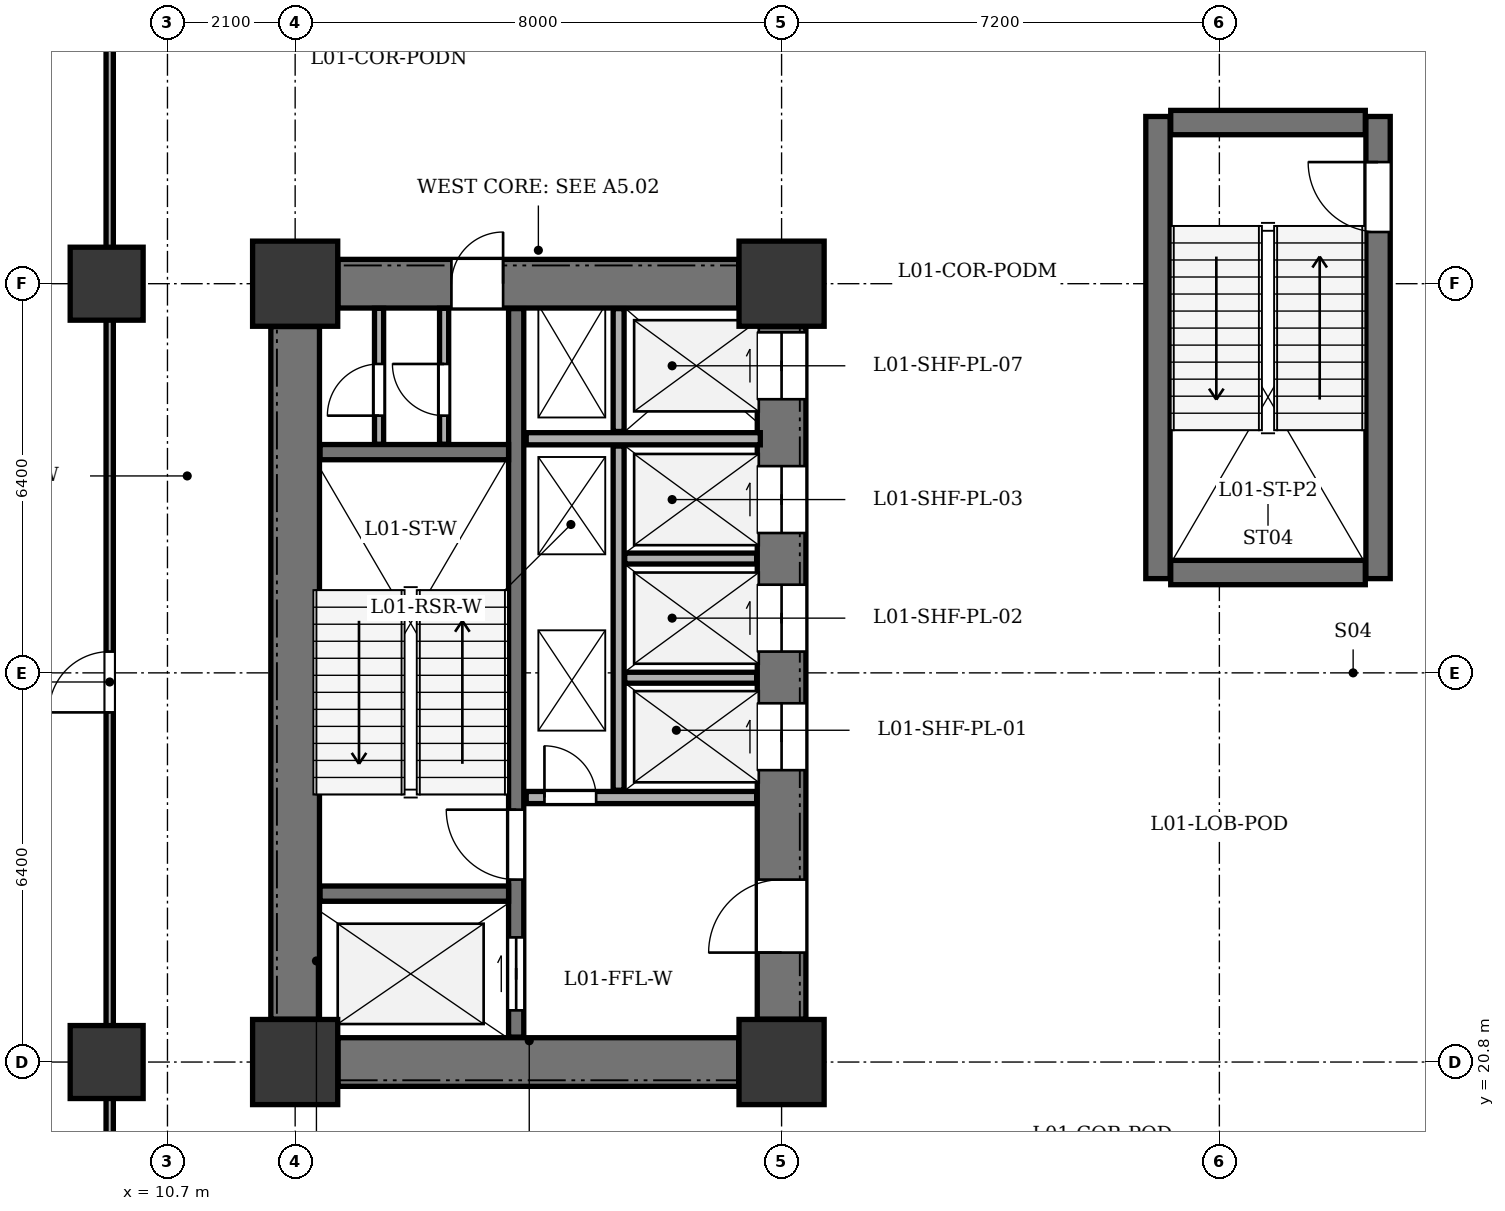
"""IFC4 building model, lengths in metres.
Left out: names, types, materials, properties, quantities, classifications, styles, units other than length and angle.
Written with IfcOpenShell. Run it as: python <this file> out.ifc"""

import sys

from ifc_helpers import new_model, si_unit, direction, frame, frame_2d, origin, origin_2d, place, context, subcontext, project, spatial, rectangle, extrude, element, fill, save


model = new_model("IFC4")
c1 = context("Model", 3, precision=1e-05, world=origin(), true_north=direction((0.0, 1.0)))
c2 = subcontext(c1, "Body", "Model", "MODEL_VIEW")
j1 = project(units=[si_unit("LENGTHUNIT", "METRE"), si_unit("PLANEANGLEUNIT", "RADIAN")], contexts=[c1])
p1 = place(None, origin())
s1 = spatial("IfcSite", under=j1, at=p1, CompositionType="ELEMENT")
p2 = place(p1, origin())
s2 = spatial("IfcBuilding", under=s1, at=p2, CompositionType="ELEMENT")
p3 = place(p2, frame((0.0, 0.0, 5.4)))
s3 = spatial("IfcBuildingStorey", under=s2, at=p3, CompositionType="ELEMENT", Elevation=5.4)
for number, where, z_axis, x_axis in (
    (1, (12.8, 20.8, 0.0), (0.0, 0.0, 1.0), (1.0, 0.0, 0.0)),
    (2, (20.8, 20.8, 0.0), (0.0, 0.0, 1.0), (1.0, 0.0, 0.0)),
    (3, (12.8, 33.6, 0.0), (0.0, 0.0, 1.0), (1.0, 0.0, 0.0)),
    (4, (20.8, 33.6, 0.0), (0.0, 0.0, 1.0), (1.0, 0.0, 0.0)),
):
    element("IfcColumn", number, at=place(p3, frame(where, z_axis=z_axis, x_axis=x_axis)), inside=s3, PredefinedType="COLUMN", context=c2, shape_type="SweptSolid", body=[
        extrude(rectangle(XDim=1.4, YDim=1.4, at=origin_2d()), origin(), (0.0, 0.0, 1.0), 4.5),
    ])
for number, where, z_axis, x_axis in (
    (5, (9.7, 20.8, 0.0), (0.0, 0.0, 1.0), (1.0, 0.0, 0.0)),
    (6, (9.7, 33.6, 0.0), (0.0, 0.0, 1.0), (1.0, 0.0, 0.0)),
):
    element("IfcColumn", number, at=place(p3, frame(where, z_axis=z_axis, x_axis=x_axis)), inside=s3, PredefinedType="COLUMN", context=c2, shape_type="SweptSolid", body=[
        extrude(rectangle(XDim=1.2, YDim=1.2, at=origin_2d()), origin(), (0.0, 0.0, 1.0), 4.5),
    ])
p4 = place(p3, frame((12.8, 21.505, 0.0), z_axis=(0.0, 0.0, 1.0), x_axis=(0.0, 1.0, 0.0)))
e7 = element("IfcWall", 7, at=p4, inside=s3, PredefinedType="SHEAR", context=c2, shape_type="SweptSolid", body=[
    extrude(rectangle(XDim=11.39, YDim=0.8, at=frame_2d((5.695, 0.0))), origin(), (0.0, 0.0, 1.0), 4.18),
])
p5 = place(p3, frame((13.505, 20.8, 0.0), z_axis=(0.0, 0.0, 1.0), x_axis=(1.0, 0.0, 0.0)))
e8 = element("IfcWall", 8, at=p5, inside=s3, PredefinedType="SHEAR", context=c2, shape_type="SweptSolid", body=[
    extrude(rectangle(XDim=6.59, YDim=0.8, at=frame_2d((3.295, 0.0))), origin(), (0.0, 0.0, 1.0), 4.18),
])
p6 = place(p3, frame((13.505, 33.6, 0.0), z_axis=(0.0, 0.0, 1.0), x_axis=(1.0, 0.0, 0.0)))
e9 = element("IfcWall", 9, at=p6, inside=s3, PredefinedType="SHEAR", context=c2, shape_type="SweptSolid", body=[
    extrude(rectangle(XDim=6.59, YDim=0.8, at=frame_2d((3.295, 0.0))), origin(), (0.0, 0.0, 1.0), 4.18),
])
p7 = place(p6, frame((1.865, 0.0, 0.0)))
e10 = element("IfcOpeningElement", 10, at=p7, cuts=e9, PredefinedType="OPENING", context=c2, shape_type="SweptSolid", body=[
    extrude(rectangle(XDim=0.85, YDim=2.02, at=frame_2d((0.425, 1.01))), frame((0.0, 0.41, 0.0), z_axis=(0.0, -1.0, 0.0), x_axis=(1.0, 0.0, 0.0)), (0.0, 0.0, 1.0), 0.82),
])
p8 = place(p3, frame((20.8, 21.505, 0.0), z_axis=(0.0, 0.0, 1.0), x_axis=(0.0, 1.0, 0.0)))
e11 = element("IfcWall", 11, at=p8, inside=s3, PredefinedType="SHEAR", context=c2, shape_type="SweptSolid", body=[
    extrude(rectangle(XDim=11.39, YDim=0.8, at=frame_2d((5.695, 0.0))), origin(), (0.0, 0.0, 1.0), 4.18),
])
p9 = place(p8, frame((1.095, 0.0, 0.0)))
e12 = element("IfcOpeningElement", 12, at=p9, cuts=e11, PredefinedType="OPENING", context=c2, shape_type="SweptSolid", body=[
    extrude(rectangle(XDim=1.2, YDim=2.15, at=frame_2d((0.6, 1.075))), frame((0.0, 0.41, 0.0), z_axis=(0.0, -1.0, 0.0), x_axis=(1.0, 0.0, 0.0)), (0.0, 0.0, 1.0), 0.82),
])
p10 = place(p8, frame((4.095, 0.0, 0.0)))
e13 = element("IfcOpeningElement", 13, at=p10, cuts=e11, PredefinedType="OPENING", context=c2, shape_type="SweptSolid", body=[
    extrude(rectangle(XDim=1.1, YDim=2.1, at=frame_2d((0.55, 1.05))), frame((0.0, 0.41, 0.0), z_axis=(0.0, -1.0, 0.0), x_axis=(1.0, 0.0, 0.0)), (0.0, 0.0, 1.0), 0.82),
])
p11 = place(p8, frame((6.045, 0.0, 0.0)))
e14 = element("IfcOpeningElement", 14, at=p11, cuts=e11, PredefinedType="OPENING", context=c2, shape_type="SweptSolid", body=[
    extrude(rectangle(XDim=1.1, YDim=2.1, at=frame_2d((0.55, 1.05))), frame((0.0, 0.41, 0.0), z_axis=(0.0, -1.0, 0.0), x_axis=(1.0, 0.0, 0.0)), (0.0, 0.0, 1.0), 0.82),
])
p12 = place(p8, frame((7.995, 0.0, 0.0)))
e15 = element("IfcOpeningElement", 15, at=p12, cuts=e11, PredefinedType="OPENING", context=c2, shape_type="SweptSolid", body=[
    extrude(rectangle(XDim=1.1, YDim=2.1, at=frame_2d((0.55, 1.05))), frame((0.0, 0.41, 0.0), z_axis=(0.0, -1.0, 0.0), x_axis=(1.0, 0.0, 0.0)), (0.0, 0.0, 1.0), 0.82),
])
p13 = place(p8, frame((10.195, 0.0, 0.0)))
e16 = element("IfcOpeningElement", 16, at=p13, cuts=e11, PredefinedType="OPENING", context=c2, shape_type="SweptSolid", body=[
    extrude(rectangle(XDim=1.1, YDim=2.1, at=frame_2d((0.55, 1.05))), frame((0.0, 0.41, 0.0), z_axis=(0.0, -1.0, 0.0), x_axis=(1.0, 0.0, 0.0)), (0.0, 0.0, 1.0), 0.82),
])
p14 = place(p3, frame((16.435, 21.21, 0.0), z_axis=(0.0, 0.0, 1.0), x_axis=(0.0, 1.0, 0.0)))
e17 = element("IfcWall", 17, at=p14, inside=s3, PredefinedType="SHEAR", context=c2, shape_type="SweptSolid", body=[
    extrude(rectangle(XDim=11.98, YDim=0.25, at=frame_2d((5.99, 0.0))), origin(), (0.0, 0.0, 1.0), 4.18),
])
p15 = place(p14, frame((0.44, 0.0, 0.0)))
e18 = element("IfcOpeningElement", 18, at=p15, cuts=e17, PredefinedType="OPENING", context=c2, shape_type="SweptSolid", body=[
    extrude(rectangle(XDim=1.2, YDim=2.15, at=frame_2d((0.6, 1.075))), frame((0.0, 0.135, 0.0), z_axis=(0.0, -1.0, 0.0), x_axis=(1.0, 0.0, 0.0)), (0.0, 0.0, 1.0), 0.27),
])
p16 = place(p14, frame((2.59, 0.0, 0.0)))
e19 = element("IfcOpeningElement", 19, at=p16, cuts=e17, PredefinedType="OPENING", context=c2, shape_type="SweptSolid", body=[
    extrude(rectangle(XDim=1.15, YDim=2.15, at=frame_2d((0.575, 1.075))), frame((0.0, 0.135, 0.0), z_axis=(0.0, -1.0, 0.0), x_axis=(1.0, 0.0, 0.0)), (0.0, 0.0, 1.0), 0.27),
])
for number, where, z_axis, x_axis in (
    (20, (13.21, 23.57, 0.0), (0.0, 0.0, 1.0), (1.0, 0.0, 0.0)),
    (21, (13.21, 30.83, 0.0), (0.0, 0.0, 1.0), (1.0, 0.0, 0.0)),
):
    element("IfcWall", number, at=place(p3, frame(where, z_axis=z_axis, x_axis=x_axis)), inside=s3, PredefinedType="SHEAR", context=c2, shape_type="SweptSolid", body=[
        extrude(rectangle(XDim=3.1, YDim=0.25, at=frame_2d((1.55, 0.0))), origin(), (0.0, 0.0, 1.0), 4.18),
    ])
p17 = place(p3, frame((16.6, 25.15, 0.0), z_axis=(0.0, 0.0, 1.0), x_axis=(1.0, 0.0, 0.0)))
e22 = element("IfcWall", 22, at=p17, inside=s3, PredefinedType="SOLIDWALL", context=c2, shape_type="SweptSolid", body=[
    extrude(rectangle(XDim=3.79, YDim=0.2, at=frame_2d((1.895, 0.0))), origin(), (0.0, 0.0, 1.0), 4.18),
])
p18 = place(p17, frame((0.3, 0.0, 0.0)))
e23 = element("IfcOpeningElement", 23, at=p18, cuts=e22, PredefinedType="OPENING", context=c2, shape_type="SweptSolid", body=[
    extrude(rectangle(XDim=0.85, YDim=2.02, at=frame_2d((0.425, 1.01))), frame((0.0, 0.11, 0.0), z_axis=(0.0, -1.0, 0.0), x_axis=(1.0, 0.0, 0.0)), (0.0, 0.0, 1.0), 0.22),
])
p19 = place(p3, frame((16.6, 31.05, 0.0), z_axis=(0.0, 0.0, 1.0), x_axis=(1.0, 0.0, 0.0)))
e24 = element("IfcWall", 24, at=p19, inside=s3, PredefinedType="SOLIDWALL", context=c2, shape_type="SweptSolid", body=[
    extrude(rectangle(XDim=3.85, YDim=0.2, at=frame_2d((1.925, 0.0))), origin(), (0.0, 0.0, 1.0), 4.18),
])
p20 = place(p3, frame((18.12, 25.27, 0.0), z_axis=(0.0, 0.0, 1.0), x_axis=(0.0, 1.0, 0.0)))
e25 = element("IfcWall", 25, at=p20, inside=s3, PredefinedType="PARTITIONING", context=c2, shape_type="SweptSolid", body=[
    extrude(rectangle(XDim=5.66, YDim=0.18, at=frame_2d((2.83, 0.0))), origin(), (0.0, 0.0, 1.0), 4.18),
])
p21 = place(p3, frame((18.12, 31.17, 0.0), z_axis=(0.0, 0.0, 1.0), x_axis=(0.0, 1.0, 0.0)))
e26 = element("IfcWall", 26, at=p21, inside=s3, PredefinedType="PARTITIONING", context=c2, shape_type="SweptSolid", body=[
    extrude(rectangle(XDim=2.02, YDim=0.18, at=frame_2d((1.01, 0.0))), origin(), (0.0, 0.0, 1.0), 4.18),
])
for number, where, z_axis, x_axis in (
    (27, (18.22, 27.12, 0.0), (0.0, 0.0, 1.0), (1.0, 0.0, 0.0)),
    (28, (18.22, 29.08, 0.0), (0.0, 0.0, 1.0), (1.0, 0.0, 0.0)),
):
    element("IfcWall", number, at=place(p3, frame(where, z_axis=z_axis, x_axis=x_axis)), inside=s3, PredefinedType="PARTITIONING", context=c2, shape_type="SweptSolid", body=[
        extrude(rectangle(XDim=2.17, YDim=0.18, at=frame_2d((1.085, 0.0))), origin(), (0.0, 0.0, 1.0), 4.18),
    ])
p22 = place(p3, frame((26.99, 28.75, 0.0), z_axis=(0.0, 0.0, 1.0), x_axis=(0.0, 1.0, 0.0)))
e29 = element("IfcWall", 29, at=p22, inside=s3, PredefinedType="SHEAR", context=c2, shape_type="SweptSolid", body=[
    extrude(rectangle(XDim=7.6, YDim=0.4, at=frame_2d((3.8, 0.0))), origin(), (0.0, 0.0, 1.0), 4.18),
])
p23 = place(p3, frame((30.61, 28.75, 0.0), z_axis=(0.0, 0.0, 1.0), x_axis=(0.0, 1.0, 0.0)))
e30 = element("IfcWall", 30, at=p23, inside=s3, PredefinedType="SHEAR", context=c2, shape_type="SweptSolid", body=[
    extrude(rectangle(XDim=7.6, YDim=0.4, at=frame_2d((3.8, 0.0))), origin(), (0.0, 0.0, 1.0), 4.18),
])
p24 = place(p23, frame((5.7, 0.0, 0.0)))
e31 = element("IfcOpeningElement", 31, at=p24, cuts=e30, PredefinedType="OPENING", context=c2, shape_type="SweptSolid", body=[
    extrude(rectangle(XDim=1.15, YDim=2.15, at=frame_2d((0.575, 1.075))), frame((0.0, 0.21, 0.0), z_axis=(0.0, -1.0, 0.0), x_axis=(1.0, 0.0, 0.0)), (0.0, 0.0, 1.0), 0.42),
])
for number, where, z_axis, x_axis in (
    (32, (27.2, 28.85, 0.0), (0.0, 0.0, 1.0), (1.0, 0.0, 0.0)),
    (33, (27.2, 36.25, 0.0), (0.0, 0.0, 1.0), (1.0, 0.0, 0.0)),
):
    element("IfcWall", number, at=place(p3, frame(where, z_axis=z_axis, x_axis=x_axis)), inside=s3, PredefinedType="SHEAR", context=c2, shape_type="SweptSolid", body=[
        extrude(rectangle(XDim=3.2, YDim=0.4, at=frame_2d((1.6, 0.0))), origin(), (0.0, 0.0, 1.0), 4.18),
    ])
p25 = place(p3, frame((14.18, 30.96, 0.0), z_axis=(0.0, 0.0, 1.0), x_axis=(0.0, 1.0, 0.0)))
e34 = element("IfcWall", 34, at=p25, inside=s3, PredefinedType="PARTITIONING", context=c2, shape_type="SweptSolid", body=[
    extrude(rectangle(XDim=2.235, YDim=0.15, at=frame_2d((1.118, 0.0))), origin(), (0.0, 0.0, 1.0), 4.18),
])
p26 = place(p25, frame((0.47, 0.0, 0.0)))
e35 = element("IfcOpeningElement", 35, at=p26, cuts=e34, PredefinedType="OPENING", context=c2, shape_type="SweptSolid", body=[
    extrude(rectangle(XDim=0.85, YDim=2.02, at=frame_2d((0.425, 1.01))), frame((0.0, 0.085, 0.0), z_axis=(0.0, -1.0, 0.0), x_axis=(1.0, 0.0, 0.0)), (0.0, 0.0, 1.0), 0.17),
])
p27 = place(p3, frame((15.25, 30.96, 0.0), z_axis=(0.0, 0.0, 1.0), x_axis=(0.0, 1.0, 0.0)))
e36 = element("IfcWall", 36, at=p27, inside=s3, PredefinedType="PARTITIONING", context=c2, shape_type="SweptSolid", body=[
    extrude(rectangle(XDim=2.235, YDim=0.15, at=frame_2d((1.118, 0.0))), origin(), (0.0, 0.0, 1.0), 4.18),
])
p28 = place(p27, frame((0.47, 0.0, 0.0)))
e37 = element("IfcOpeningElement", 37, at=p28, cuts=e36, PredefinedType="OPENING", context=c2, shape_type="SweptSolid", body=[
    extrude(rectangle(XDim=0.85, YDim=2.02, at=frame_2d((0.425, 1.01))), frame((0.0, 0.085, 0.0), z_axis=(0.0, -1.0, 0.0), x_axis=(1.0, 0.0, 0.0)), (0.0, 0.0, 1.0), 0.17),
])
p29 = place(p3, frame((9.75, 18.565, 0.0), z_axis=(0.0, 0.0, 1.0), x_axis=(0.0, 1.0, 0.0)))
e38 = element("IfcWall", 38, at=p29, inside=s3, PredefinedType="PARTITIONING", context=c2, shape_type="SweptSolid", body=[
    extrude(rectangle(XDim=19.72, YDim=0.12, at=frame_2d((9.86, 0.0))), origin(), (0.0, 0.0, 1.0), 3.065),
])
p30 = place(p29, frame((7.985, 0.0, 0.0)))
e39 = element("IfcOpeningElement", 39, at=p30, cuts=e38, PredefinedType="OPENING", context=c2, shape_type="SweptSolid", body=[
    extrude(rectangle(XDim=1.0, YDim=2.1, at=frame_2d((0.5, 1.05))), frame((0.0, 0.07, 0.0), z_axis=(0.0, -1.0, 0.0), x_axis=(1.0, 0.0, 0.0)), (0.0, 0.0, 1.0), 0.14),
])
p31 = place(p7, origin())
e40 = element("IfcDoor", 40, at=p31, inside=s3, OperationType="SINGLE_SWING_RIGHT", PredefinedType="DOOR", context=c2, shape_type="SweptSolid", body=[
    extrude(rectangle(XDim=0.85, YDim=2.02, at=frame_2d((0.425, 1.01))), frame((0.0, 0.025, 0.0), z_axis=(0.0, -1.0, 0.0), x_axis=(1.0, 0.0, 0.0)), (0.0, 0.0, 1.0), 0.05),
])
fill(e10, e40)
p32 = place(p9, origin())
e41 = element("IfcDoor", 41, at=p32, inside=s3, OperationType="SINGLE_SWING_LEFT", PredefinedType="DOOR", context=c2, shape_type="SweptSolid", body=[
    extrude(rectangle(XDim=1.2, YDim=2.15, at=frame_2d((0.6, 1.075))), frame((0.0, 0.025, 0.0), z_axis=(0.0, -1.0, 0.0), x_axis=(1.0, 0.0, 0.0)), (0.0, 0.0, 1.0), 0.05),
])
fill(e12, e41)
p33 = place(p10, origin())
e42 = element("IfcDoor", 42, at=p33, inside=s3, OperationType="DOUBLE_DOOR_SLIDING", PredefinedType="DOOR", context=c2, shape_type="SweptSolid", body=[
    extrude(rectangle(XDim=1.1, YDim=2.1, at=frame_2d((0.55, 1.05))), frame((0.0, 0.025, 0.0), z_axis=(0.0, -1.0, 0.0), x_axis=(1.0, 0.0, 0.0)), (0.0, 0.0, 1.0), 0.05),
])
fill(e13, e42)
p34 = place(p11, origin())
e43 = element("IfcDoor", 43, at=p34, inside=s3, OperationType="DOUBLE_DOOR_SLIDING", PredefinedType="DOOR", context=c2, shape_type="SweptSolid", body=[
    extrude(rectangle(XDim=1.1, YDim=2.1, at=frame_2d((0.55, 1.05))), frame((0.0, 0.025, 0.0), z_axis=(0.0, -1.0, 0.0), x_axis=(1.0, 0.0, 0.0)), (0.0, 0.0, 1.0), 0.05),
])
fill(e14, e43)
p35 = place(p12, origin())
e44 = element("IfcDoor", 44, at=p35, inside=s3, OperationType="DOUBLE_DOOR_SLIDING", PredefinedType="DOOR", context=c2, shape_type="SweptSolid", body=[
    extrude(rectangle(XDim=1.1, YDim=2.1, at=frame_2d((0.55, 1.05))), frame((0.0, 0.025, 0.0), z_axis=(0.0, -1.0, 0.0), x_axis=(1.0, 0.0, 0.0)), (0.0, 0.0, 1.0), 0.05),
])
fill(e15, e44)
p36 = place(p13, origin())
e45 = element("IfcDoor", 45, at=p36, inside=s3, OperationType="DOUBLE_DOOR_SLIDING", PredefinedType="DOOR", context=c2, shape_type="SweptSolid", body=[
    extrude(rectangle(XDim=1.1, YDim=2.1, at=frame_2d((0.55, 1.05))), frame((0.0, 0.025, 0.0), z_axis=(0.0, -1.0, 0.0), x_axis=(1.0, 0.0, 0.0)), (0.0, 0.0, 1.0), 0.05),
])
fill(e16, e45)
p37 = place(p15, origin())
e46 = element("IfcDoor", 46, at=p37, inside=s3, OperationType="DOUBLE_DOOR_SLIDING", PredefinedType="DOOR", context=c2, shape_type="SweptSolid", body=[
    extrude(rectangle(XDim=1.2, YDim=2.15, at=frame_2d((0.6, 1.075))), frame((0.0, 0.025, 0.0), z_axis=(0.0, -1.0, 0.0), x_axis=(1.0, 0.0, 0.0)), (0.0, 0.0, 1.0), 0.05),
])
fill(e18, e46)
p38 = place(p16, origin())
e47 = element("IfcDoor", 47, at=p38, inside=s3, OperationType="SINGLE_SWING_RIGHT", PredefinedType="DOOR", context=c2, shape_type="SweptSolid", body=[
    extrude(rectangle(XDim=1.15, YDim=2.15, at=frame_2d((0.575, 1.075))), frame((0.0, 0.025, 0.0), z_axis=(0.0, -1.0, 0.0), x_axis=(1.0, 0.0, 0.0)), (0.0, 0.0, 1.0), 0.05),
])
fill(e19, e47)
p39 = place(p18, origin())
e48 = element("IfcDoor", 48, at=p39, inside=s3, OperationType="SINGLE_SWING_LEFT", PredefinedType="DOOR", context=c2, shape_type="SweptSolid", body=[
    extrude(rectangle(XDim=0.85, YDim=2.02, at=frame_2d((0.425, 1.01))), frame((0.0, 0.025, 0.0), z_axis=(0.0, -1.0, 0.0), x_axis=(1.0, 0.0, 0.0)), (0.0, 0.0, 1.0), 0.05),
])
fill(e23, e48)
p40 = place(p24, origin())
e49 = element("IfcDoor", 49, at=p40, inside=s3, OperationType="SINGLE_SWING_RIGHT", PredefinedType="DOOR", context=c2, shape_type="SweptSolid", body=[
    extrude(rectangle(XDim=1.15, YDim=2.15, at=frame_2d((0.575, 1.075))), frame((0.0, 0.025, 0.0), z_axis=(0.0, -1.0, 0.0), x_axis=(1.0, 0.0, 0.0)), (0.0, 0.0, 1.0), 0.05),
])
fill(e31, e49)
p41 = place(p26, origin())
e50 = element("IfcDoor", 50, at=p41, inside=s3, OperationType="SINGLE_SWING_LEFT", PredefinedType="DOOR", context=c2, shape_type="SweptSolid", body=[
    extrude(rectangle(XDim=0.85, YDim=2.02, at=frame_2d((0.425, 1.01))), frame((0.0, 0.025, 0.0), z_axis=(0.0, -1.0, 0.0), x_axis=(1.0, 0.0, 0.0)), (0.0, 0.0, 1.0), 0.05),
])
fill(e35, e50)
p42 = place(p28, origin())
e51 = element("IfcDoor", 51, at=p42, inside=s3, OperationType="SINGLE_SWING_RIGHT", PredefinedType="DOOR", context=c2, shape_type="SweptSolid", body=[
    extrude(rectangle(XDim=0.85, YDim=2.02, at=frame_2d((0.425, 1.01))), frame((0.0, 0.025, 0.0), z_axis=(0.0, -1.0, 0.0), x_axis=(1.0, 0.0, 0.0)), (0.0, 0.0, 1.0), 0.05),
])
fill(e37, e51)
p43 = place(p30, origin())
e52 = element("IfcDoor", 52, at=p43, inside=s3, OperationType="SINGLE_SWING_LEFT", PredefinedType="DOOR", context=c2, shape_type="SweptSolid", body=[
    extrude(rectangle(XDim=1.0, YDim=2.1, at=frame_2d((0.5, 1.05))), frame((0.0, 0.025, 0.0), z_axis=(0.0, -1.0, 0.0), x_axis=(1.0, 0.0, 0.0)), (0.0, 0.0, 1.0), 0.05),
])
fill(e39, e52)
save(model, sys.argv[1])
